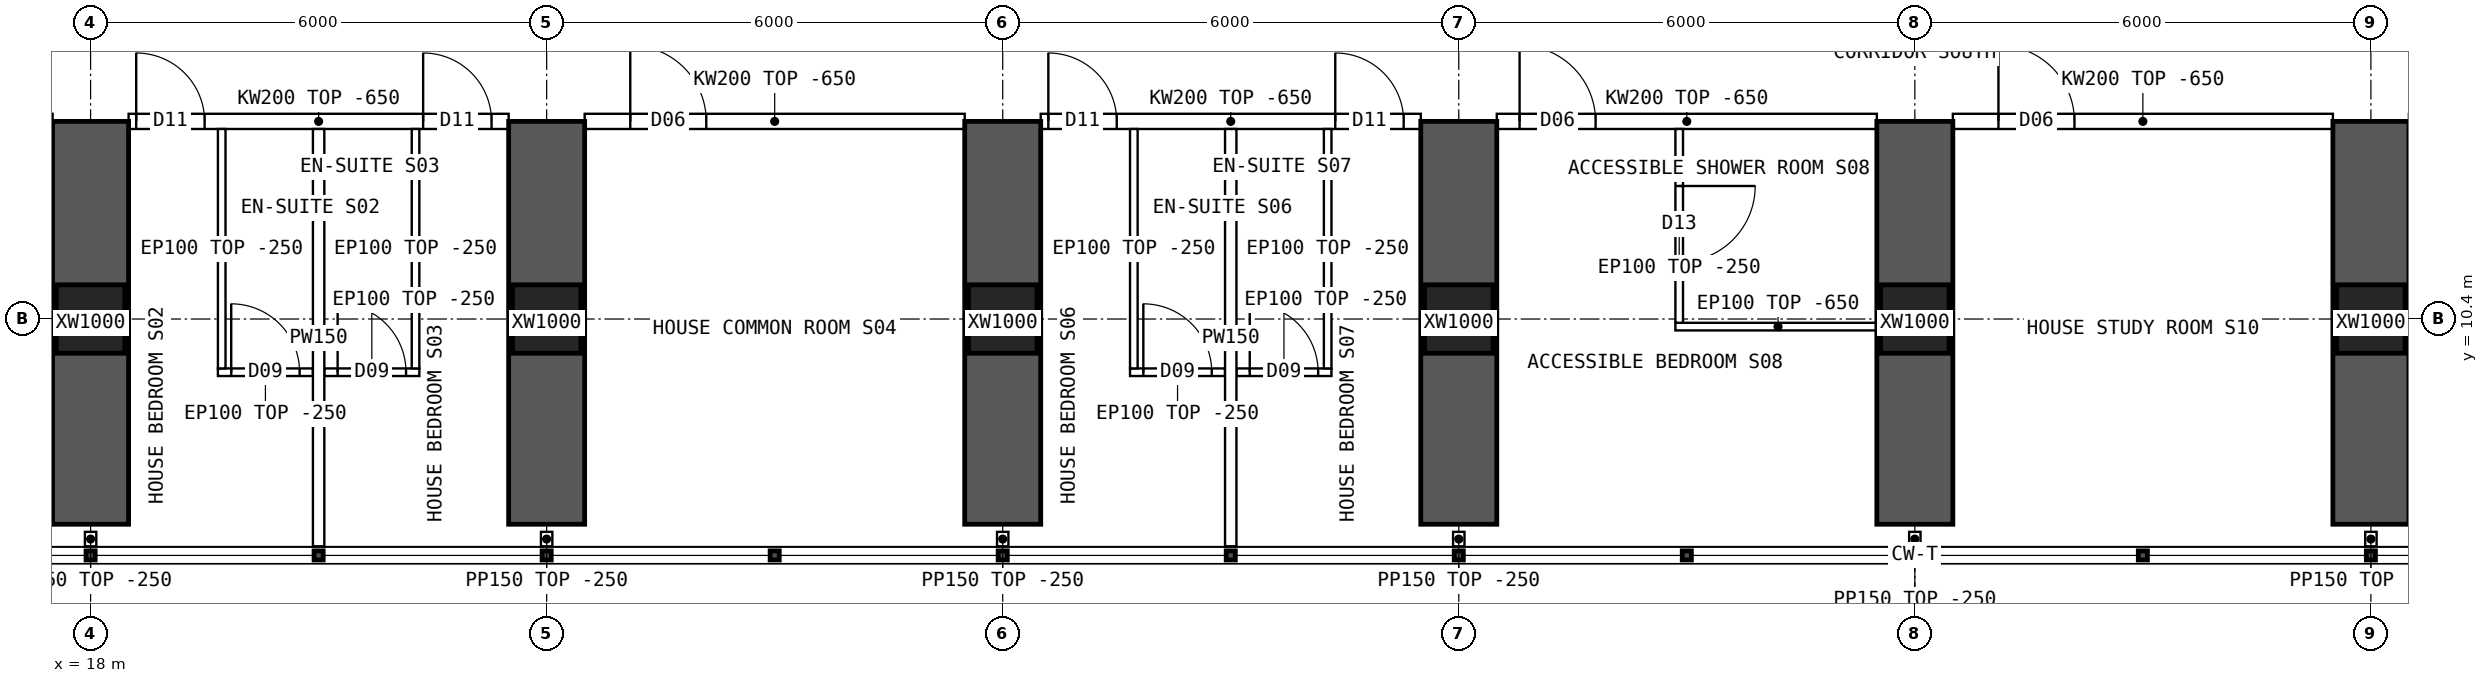
"""IFC4 building model, lengths in metres.
Left out: names, types, materials, properties, quantities, classifications, styles, units other than length and angle.
Written with IfcOpenShell. Run it as: python <this file> out.ifc"""

import sys

from ifc_helpers import new_model, si_unit, direction, frame, frame_2d, origin, origin_2d, place, context, subcontext, project, spatial, polyline, rectangle, hollow_rectangle, outline, extrude, element, fill, save


model = new_model("IFC4")
c1 = context("Model", 3, precision=1e-05, world=origin(), true_north=direction((0.0, 1.0)))
c2 = subcontext(c1, "Body", "Model", "MODEL_VIEW")
j1 = project(units=[si_unit("LENGTHUNIT", "METRE"), si_unit("PLANEANGLEUNIT", "RADIAN")], contexts=[c1])
p1 = place(None, origin())
s1 = spatial("IfcSite", under=j1, at=p1, CompositionType="ELEMENT")
p2 = place(p1, origin())
s2 = spatial("IfcBuilding", under=s1, at=p2, CompositionType="ELEMENT")
p3 = place(p2, frame((0.0, 0.0, 53.95)))
s3 = spatial("IfcBuildingStorey", under=s2, at=p3, CompositionType="ELEMENT", Elevation=53.95)
for number, where, z_axis, x_axis in (
    (1, (18.0, 10.4, 0.0), (0.0, 0.0, 1.0), (1.0, 0.0, 0.0)),
    (2, (24.0, 10.4, 0.0), (0.0, 0.0, 1.0), (1.0, 0.0, 0.0)),
    (3, (30.0, 10.4, 0.0), (0.0, 0.0, 1.0), (1.0, 0.0, 0.0)),
    (4, (36.0, 10.4, 0.0), (0.0, 0.0, 1.0), (1.0, 0.0, 0.0)),
    (5, (42.0, 10.4, 0.0), (0.0, 0.0, 1.0), (1.0, 0.0, 0.0)),
    (6, (48.0, 10.4, 0.0), (0.0, 0.0, 1.0), (1.0, 0.0, 0.0)),
):
    element("IfcColumn", number, at=place(p3, frame(where, z_axis=z_axis, x_axis=x_axis)), inside=s3, PredefinedType="COLUMN", context=c2, shape_type="SweptSolid", body=[
        extrude(hollow_rectangle(XDim=0.9, YDim=0.9, WallThickness=0.09, at=origin_2d()), origin(), (0.0, 0.0, 1.0), 3.75),
    ])
for number, where, z_axis, x_axis in (
    (7, (18.0, 7.7, 0.0), (0.0, 0.0, 1.0), (0.0, 1.0, 0.0)),
    (8, (24.0, 7.7, 0.0), (0.0, 0.0, 1.0), (0.0, 1.0, 0.0)),
    (9, (30.0, 7.7, 0.0), (0.0, 0.0, 1.0), (0.0, 1.0, 0.0)),
    (10, (36.0, 7.7, 0.0), (0.0, 0.0, 1.0), (0.0, 1.0, 0.0)),
    (11, (42.0, 7.7, 0.0), (0.0, 0.0, 1.0), (0.0, 1.0, 0.0)),
    (12, (48.0, 7.7, 0.0), (0.0, 0.0, 1.0), (0.0, 1.0, 0.0)),
):
    element("IfcWall", number, at=place(p3, frame(where, z_axis=z_axis, x_axis=x_axis)), inside=s3, PredefinedType="SHEAR", context=c2, shape_type="SweptSolid", body=[
        extrude(rectangle(XDim=5.3, YDim=1.0, at=frame_2d((2.65, 0.0))), origin(), (0.0, 0.0, 1.0), 3.75),
    ])
p4 = place(p3, frame((18.5, 13.0, 0.0), z_axis=(0.0, 0.0, 1.0), x_axis=(1.0, 0.0, 0.0)))
e13 = element("IfcWall", 13, at=p4, inside=s3, PredefinedType="SOLIDWALL", context=c2, shape_type="SweptSolid", body=[
    extrude(outline(polyline([(0.0, 0.0), (5.0, 0.0), (5.0, 3.1), (0.0, 3.1), (0.0, 0.0)])), frame((0.0, 0.1, 0.0), z_axis=(0.0, -1.0, 0.0), x_axis=(1.0, 0.0, 0.0)), (0.0, 0.0, 1.0), 0.2),
])
p5 = place(p4, frame((0.1, 0.0, 0.0)))
e14 = element("IfcOpeningElement", 14, at=p5, cuts=e13, PredefinedType="OPENING", context=c2, shape_type="SweptSolid", body=[
    extrude(rectangle(XDim=0.9, YDim=2.1, at=frame_2d((0.45, 1.05))), frame((0.0, 0.11, 0.0), z_axis=(0.0, -1.0, 0.0), x_axis=(1.0, 0.0, 0.0)), (0.0, 0.0, 1.0), 0.22),
])
p6 = place(p4, frame((3.875, 0.0, 0.0)))
e15 = element("IfcOpeningElement", 15, at=p6, cuts=e13, PredefinedType="OPENING", context=c2, shape_type="SweptSolid", body=[
    extrude(rectangle(XDim=0.9, YDim=2.1, at=frame_2d((0.45, 1.05))), frame((0.0, 0.11, 0.0), z_axis=(0.0, -1.0, 0.0), x_axis=(1.0, 0.0, 0.0)), (0.0, 0.0, 1.0), 0.22),
])
p7 = place(p3, frame((24.5, 13.0, 0.0), z_axis=(0.0, 0.0, 1.0), x_axis=(1.0, 0.0, 0.0)))
e16 = element("IfcWall", 16, at=p7, inside=s3, PredefinedType="SOLIDWALL", context=c2, shape_type="SweptSolid", body=[
    extrude(outline(polyline([(0.0, 0.0), (5.0, 0.0), (5.0, 3.1), (0.0, 3.1), (0.0, 0.0)])), frame((0.0, 0.1, 0.0), z_axis=(0.0, -1.0, 0.0), x_axis=(1.0, 0.0, 0.0)), (0.0, 0.0, 1.0), 0.2),
])
p8 = place(p7, frame((0.6, 0.0, 0.0)))
e17 = element("IfcOpeningElement", 17, at=p8, cuts=e16, PredefinedType="OPENING", context=c2, shape_type="SweptSolid", body=[
    extrude(rectangle(XDim=1.0, YDim=2.1, at=frame_2d((0.5, 1.05))), frame((0.0, 0.11, 0.0), z_axis=(0.0, -1.0, 0.0), x_axis=(1.0, 0.0, 0.0)), (0.0, 0.0, 1.0), 0.22),
])
p9 = place(p3, frame((30.5, 13.0, 0.0), z_axis=(0.0, 0.0, 1.0), x_axis=(1.0, 0.0, 0.0)))
e18 = element("IfcWall", 18, at=p9, inside=s3, PredefinedType="SOLIDWALL", context=c2, shape_type="SweptSolid", body=[
    extrude(outline(polyline([(0.0, 0.0), (5.0, 0.0), (5.0, 3.1), (0.0, 3.1), (0.0, 0.0)])), frame((0.0, 0.1, 0.0), z_axis=(0.0, -1.0, 0.0), x_axis=(1.0, 0.0, 0.0)), (0.0, 0.0, 1.0), 0.2),
])
p10 = place(p9, frame((0.1, 0.0, 0.0)))
e19 = element("IfcOpeningElement", 19, at=p10, cuts=e18, PredefinedType="OPENING", context=c2, shape_type="SweptSolid", body=[
    extrude(rectangle(XDim=0.9, YDim=2.1, at=frame_2d((0.45, 1.05))), frame((0.0, 0.11, 0.0), z_axis=(0.0, -1.0, 0.0), x_axis=(1.0, 0.0, 0.0)), (0.0, 0.0, 1.0), 0.22),
])
p11 = place(p9, frame((3.875, 0.0, 0.0)))
e20 = element("IfcOpeningElement", 20, at=p11, cuts=e18, PredefinedType="OPENING", context=c2, shape_type="SweptSolid", body=[
    extrude(rectangle(XDim=0.9, YDim=2.1, at=frame_2d((0.45, 1.05))), frame((0.0, 0.11, 0.0), z_axis=(0.0, -1.0, 0.0), x_axis=(1.0, 0.0, 0.0)), (0.0, 0.0, 1.0), 0.22),
])
p12 = place(p3, frame((36.5, 13.0, 0.0), z_axis=(0.0, 0.0, 1.0), x_axis=(1.0, 0.0, 0.0)))
e21 = element("IfcWall", 21, at=p12, inside=s3, PredefinedType="SOLIDWALL", context=c2, shape_type="SweptSolid", body=[
    extrude(outline(polyline([(0.0, 0.0), (5.0, 0.0), (5.0, 3.1), (0.0, 3.1), (0.0, 0.0)])), frame((0.0, 0.1, 0.0), z_axis=(0.0, -1.0, 0.0), x_axis=(1.0, 0.0, 0.0)), (0.0, 0.0, 1.0), 0.2),
])
p13 = place(p12, frame((0.3, 0.0, 0.0)))
e22 = element("IfcOpeningElement", 22, at=p13, cuts=e21, PredefinedType="OPENING", context=c2, shape_type="SweptSolid", body=[
    extrude(rectangle(XDim=1.0, YDim=2.1, at=frame_2d((0.5, 1.05))), frame((0.0, 0.11, 0.0), z_axis=(0.0, -1.0, 0.0), x_axis=(1.0, 0.0, 0.0)), (0.0, 0.0, 1.0), 0.22),
])
p14 = place(p3, frame((42.5, 13.0, 0.0), z_axis=(0.0, 0.0, 1.0), x_axis=(1.0, 0.0, 0.0)))
e23 = element("IfcWall", 23, at=p14, inside=s3, PredefinedType="SOLIDWALL", context=c2, shape_type="SweptSolid", body=[
    extrude(outline(polyline([(0.0, 0.0), (5.0, 0.0), (5.0, 3.1), (0.0, 3.1), (0.0, 0.0)])), frame((0.0, 0.1, 0.0), z_axis=(0.0, -1.0, 0.0), x_axis=(1.0, 0.0, 0.0)), (0.0, 0.0, 1.0), 0.2),
])
p15 = place(p14, frame((0.6, 0.0, 0.0)))
e24 = element("IfcOpeningElement", 24, at=p15, cuts=e23, PredefinedType="OPENING", context=c2, shape_type="SweptSolid", body=[
    extrude(rectangle(XDim=1.0, YDim=2.1, at=frame_2d((0.5, 1.05))), frame((0.0, 0.11, 0.0), z_axis=(0.0, -1.0, 0.0), x_axis=(1.0, 0.0, 0.0)), (0.0, 0.0, 1.0), 0.22),
])
p16 = place(p3, frame((21.0, 7.41, 0.0), z_axis=(0.0, 0.0, 1.0), x_axis=(0.0, 1.0, 0.0)))
e25 = element("IfcWall", 25, at=p16, inside=s3, PredefinedType="PARTITIONING", context=c2, shape_type="SweptSolid", body=[
    extrude(outline(polyline([(0.0, 0.0), (5.49, 0.0), (5.49, 3.1), (5.442, 3.1), (5.44, 3.5), (3.192, 3.5), (3.19, 3.1), (2.792, 3.1), (2.79, 3.5), (0.0, 3.5), (0.0, 0.0)])), frame((0.0, 0.075, 0.0), z_axis=(0.0, -1.0, 0.0), x_axis=(1.0, 0.0, 0.0)), (0.0, 0.0, 1.0), 0.15),
])
p17 = place(p3, frame((20.925, 9.7, 0.0), z_axis=(0.0, 0.0, 1.0), x_axis=(-1.0, 0.0, 0.0)))
e26 = element("IfcWall", 26, at=p17, inside=s3, PredefinedType="PARTITIONING", context=c2, shape_type="SweptSolid", body=[
    extrude(rectangle(XDim=1.25, YDim=0.1, at=frame_2d((0.625, 0.0))), origin(), (0.0, 0.0, 1.0), 3.5),
])
p18 = place(p17, frame((0.175, 0.0, 0.0)))
e27 = element("IfcOpeningElement", 27, at=p18, cuts=e26, PredefinedType="OPENING", context=c2, shape_type="SweptSolid", body=[
    extrude(rectangle(XDim=0.9, YDim=2.1, at=frame_2d((0.45, 1.05))), frame((0.0, 0.06, 0.0), z_axis=(0.0, -1.0, 0.0), x_axis=(1.0, 0.0, 0.0)), (0.0, 0.0, 1.0), 0.12),
])
p19 = place(p3, frame((19.725, 9.75, 0.0), z_axis=(0.0, 0.0, 1.0), x_axis=(0.0, 1.0, 0.0)))
e28 = element("IfcWall", 28, at=p19, inside=s3, PredefinedType="PARTITIONING", context=c2, shape_type="SweptSolid", body=[
    extrude(outline(polyline([(0.0, 0.0), (3.15, 0.0), (3.15, 3.1), (3.102, 3.1), (3.1, 3.5), (0.852, 3.5), (0.85, 3.1), (0.452, 3.1), (0.45, 3.5), (0.0, 3.5), (0.0, 0.0)])), frame((0.0, 0.05, 0.0), z_axis=(0.0, -1.0, 0.0), x_axis=(1.0, 0.0, 0.0)), (0.0, 0.0, 1.0), 0.1),
])
p20 = place(p3, frame((22.325, 9.7, 0.0), z_axis=(0.0, 0.0, 1.0), x_axis=(-1.0, 0.0, 0.0)))
e29 = element("IfcWall", 29, at=p20, inside=s3, PredefinedType="PARTITIONING", context=c2, shape_type="SweptSolid", body=[
    extrude(rectangle(XDim=1.25, YDim=0.1, at=frame_2d((0.625, 0.0))), origin(), (0.0, 0.0, 1.0), 3.5),
])
p21 = place(p20, frame((0.175, 0.0, 0.0)))
e30 = element("IfcOpeningElement", 30, at=p21, cuts=e29, PredefinedType="OPENING", context=c2, shape_type="SweptSolid", body=[
    extrude(rectangle(XDim=0.9, YDim=2.1, at=frame_2d((0.45, 1.05))), frame((0.0, 0.06, 0.0), z_axis=(0.0, -1.0, 0.0), x_axis=(1.0, 0.0, 0.0)), (0.0, 0.0, 1.0), 0.12),
])
p22 = place(p3, frame((22.275, 9.75, 0.0), z_axis=(0.0, 0.0, 1.0), x_axis=(0.0, 1.0, 0.0)))
e31 = element("IfcWall", 31, at=p22, inside=s3, PredefinedType="PARTITIONING", context=c2, shape_type="SweptSolid", body=[
    extrude(outline(polyline([(0.0, 0.0), (3.15, 0.0), (3.15, 3.1), (3.102, 3.1), (3.1, 3.5), (0.852, 3.5), (0.85, 3.1), (0.452, 3.1), (0.45, 3.5), (0.0, 3.5), (0.0, 0.0)])), frame((0.0, 0.05, 0.0), z_axis=(0.0, -1.0, 0.0), x_axis=(1.0, 0.0, 0.0)), (0.0, 0.0, 1.0), 0.1),
])
p23 = place(p3, frame((33.0, 7.41, 0.0), z_axis=(0.0, 0.0, 1.0), x_axis=(0.0, 1.0, 0.0)))
e32 = element("IfcWall", 32, at=p23, inside=s3, PredefinedType="PARTITIONING", context=c2, shape_type="SweptSolid", body=[
    extrude(outline(polyline([(0.0, 0.0), (5.49, 0.0), (5.49, 3.1), (5.442, 3.1), (5.44, 3.5), (3.192, 3.5), (3.19, 3.1), (2.792, 3.1), (2.79, 3.5), (0.0, 3.5), (0.0, 0.0)])), frame((0.0, 0.075, 0.0), z_axis=(0.0, -1.0, 0.0), x_axis=(1.0, 0.0, 0.0)), (0.0, 0.0, 1.0), 0.15),
])
p24 = place(p3, frame((32.925, 9.7, 0.0), z_axis=(0.0, 0.0, 1.0), x_axis=(-1.0, 0.0, 0.0)))
e33 = element("IfcWall", 33, at=p24, inside=s3, PredefinedType="PARTITIONING", context=c2, shape_type="SweptSolid", body=[
    extrude(rectangle(XDim=1.25, YDim=0.1, at=frame_2d((0.625, 0.0))), origin(), (0.0, 0.0, 1.0), 3.5),
])
p25 = place(p24, frame((0.175, 0.0, 0.0)))
e34 = element("IfcOpeningElement", 34, at=p25, cuts=e33, PredefinedType="OPENING", context=c2, shape_type="SweptSolid", body=[
    extrude(rectangle(XDim=0.9, YDim=2.1, at=frame_2d((0.45, 1.05))), frame((0.0, 0.06, 0.0), z_axis=(0.0, -1.0, 0.0), x_axis=(1.0, 0.0, 0.0)), (0.0, 0.0, 1.0), 0.12),
])
p26 = place(p3, frame((31.725, 9.75, 0.0), z_axis=(0.0, 0.0, 1.0), x_axis=(0.0, 1.0, 0.0)))
e35 = element("IfcWall", 35, at=p26, inside=s3, PredefinedType="PARTITIONING", context=c2, shape_type="SweptSolid", body=[
    extrude(outline(polyline([(0.0, 0.0), (3.15, 0.0), (3.15, 3.1), (3.102, 3.1), (3.1, 3.5), (0.852, 3.5), (0.85, 3.1), (0.452, 3.1), (0.45, 3.5), (0.0, 3.5), (0.0, 0.0)])), frame((0.0, 0.05, 0.0), z_axis=(0.0, -1.0, 0.0), x_axis=(1.0, 0.0, 0.0)), (0.0, 0.0, 1.0), 0.1),
])
p27 = place(p3, frame((34.325, 9.7, 0.0), z_axis=(0.0, 0.0, 1.0), x_axis=(-1.0, 0.0, 0.0)))
e36 = element("IfcWall", 36, at=p27, inside=s3, PredefinedType="PARTITIONING", context=c2, shape_type="SweptSolid", body=[
    extrude(rectangle(XDim=1.25, YDim=0.1, at=frame_2d((0.625, 0.0))), origin(), (0.0, 0.0, 1.0), 3.5),
])
p28 = place(p27, frame((0.175, 0.0, 0.0)))
e37 = element("IfcOpeningElement", 37, at=p28, cuts=e36, PredefinedType="OPENING", context=c2, shape_type="SweptSolid", body=[
    extrude(rectangle(XDim=0.9, YDim=2.1, at=frame_2d((0.45, 1.05))), frame((0.0, 0.06, 0.0), z_axis=(0.0, -1.0, 0.0), x_axis=(1.0, 0.0, 0.0)), (0.0, 0.0, 1.0), 0.12),
])
p29 = place(p3, frame((34.275, 9.75, 0.0), z_axis=(0.0, 0.0, 1.0), x_axis=(0.0, 1.0, 0.0)))
e38 = element("IfcWall", 38, at=p29, inside=s3, PredefinedType="PARTITIONING", context=c2, shape_type="SweptSolid", body=[
    extrude(outline(polyline([(0.0, 0.0), (3.15, 0.0), (3.15, 3.1), (3.102, 3.1), (3.1, 3.5), (0.852, 3.5), (0.85, 3.1), (0.452, 3.1), (0.45, 3.5), (0.0, 3.5), (0.0, 0.0)])), frame((0.0, 0.05, 0.0), z_axis=(0.0, -1.0, 0.0), x_axis=(1.0, 0.0, 0.0)), (0.0, 0.0, 1.0), 0.1),
])
p30 = place(p3, frame((38.85, 10.3, 0.0), z_axis=(0.0, 0.0, 1.0), x_axis=(1.0, 0.0, 0.0)))
e39 = element("IfcWall", 39, at=p30, inside=s3, PredefinedType="PARTITIONING", context=c2, shape_type="SweptSolid", body=[
    extrude(outline(polyline([(0.0, 0.0), (2.7, 0.0), (2.7, 3.1), (0.0, 3.1), (0.0, 0.0)])), frame((0.0, 0.05, 0.0), z_axis=(0.0, -1.0, 0.0), x_axis=(1.0, 0.0, 0.0)), (0.0, 0.0, 1.0), 0.1),
])
p31 = place(p3, frame((38.9, 10.35, 0.0), z_axis=(0.0, 0.0, 1.0), x_axis=(0.0, 1.0, 0.0)))
e40 = element("IfcWall", 40, at=p31, inside=s3, PredefinedType="PARTITIONING", context=c2, shape_type="SweptSolid", body=[
    extrude(outline(polyline([(0.0, 0.0), (2.55, 0.0), (2.55, 3.1), (2.502, 3.1), (2.5, 3.5), (0.252, 3.5), (0.25, 3.1), (0.0, 3.1), (0.0, 0.0)])), frame((0.0, 0.05, 0.0), z_axis=(0.0, -1.0, 0.0), x_axis=(1.0, 0.0, 0.0)), (0.0, 0.0, 1.0), 0.1),
])
p32 = place(p31, frame((0.8, 0.0, 0.0)))
e41 = element("IfcOpeningElement", 41, at=p32, cuts=e40, PredefinedType="OPENING", context=c2, shape_type="SweptSolid", body=[
    extrude(rectangle(XDim=1.0, YDim=2.1, at=frame_2d((0.5, 1.05))), frame((0.0, 0.06, 0.0), z_axis=(0.0, -1.0, 0.0), x_axis=(1.0, 0.0, 0.0)), (0.0, 0.0, 1.0), 0.12),
])
for number, where, z_axis, x_axis in (
    (42, (18.0, 7.6, 0.0), (0.0, 0.0, 1.0), (0.0, -1.0, 0.0)),
    (43, (24.0, 7.6, 0.0), (0.0, 0.0, 1.0), (0.0, -1.0, 0.0)),
    (44, (30.0, 7.6, 0.0), (0.0, 0.0, 1.0), (0.0, -1.0, 0.0)),
    (45, (36.0, 7.6, 0.0), (0.0, 0.0, 1.0), (0.0, -1.0, 0.0)),
    (46, (42.0, 7.6, 0.0), (0.0, 0.0, 1.0), (0.0, -1.0, 0.0)),
    (47, (48.0, 7.6, 0.0), (0.0, 0.0, 1.0), (0.0, -1.0, 0.0)),
):
    element("IfcWall", number, at=place(p3, frame(where, z_axis=z_axis, x_axis=x_axis)), inside=s3, PredefinedType="PARTITIONING", context=c2, shape_type="SweptSolid", body=[
        extrude(rectangle(XDim=0.19, YDim=0.15, at=frame_2d((0.095, 0.0))), origin(), (0.0, 0.0, 1.0), 3.5),
    ])
p33 = place(p18, origin())
e48 = element("IfcDoor", 48, at=p33, inside=s3, OperationType="SINGLE_SWING_RIGHT", PredefinedType="DOOR", context=c2, shape_type="SweptSolid", body=[
    extrude(rectangle(XDim=0.9, YDim=2.1, at=frame_2d((0.45, 1.05))), frame((0.0, 0.025, 0.0), z_axis=(0.0, -1.0, 0.0), x_axis=(1.0, 0.0, 0.0)), (0.0, 0.0, 1.0), 0.05),
])
fill(e27, e48)
p34 = place(p5, origin())
e49 = element("IfcDoor", 49, at=p34, inside=s3, OperationType="SINGLE_SWING_LEFT", PredefinedType="DOOR", context=c2, shape_type="SweptSolid", body=[
    extrude(rectangle(XDim=0.9, YDim=2.1, at=frame_2d((0.45, 1.05))), frame((0.0, 0.025, 0.0), z_axis=(0.0, -1.0, 0.0), x_axis=(1.0, 0.0, 0.0)), (0.0, 0.0, 1.0), 0.05),
])
fill(e14, e49)
p35 = place(p21, origin())
e50 = element("IfcDoor", 50, at=p35, inside=s3, OperationType="SINGLE_SWING_RIGHT", PredefinedType="DOOR", context=c2, shape_type="SweptSolid", body=[
    extrude(rectangle(XDim=0.9, YDim=2.1, at=frame_2d((0.45, 1.05))), frame((0.0, 0.025, 0.0), z_axis=(0.0, -1.0, 0.0), x_axis=(1.0, 0.0, 0.0)), (0.0, 0.0, 1.0), 0.05),
])
fill(e30, e50)
p36 = place(p6, origin())
e51 = element("IfcDoor", 51, at=p36, inside=s3, OperationType="SINGLE_SWING_LEFT", PredefinedType="DOOR", context=c2, shape_type="SweptSolid", body=[
    extrude(rectangle(XDim=0.9, YDim=2.1, at=frame_2d((0.45, 1.05))), frame((0.0, 0.025, 0.0), z_axis=(0.0, -1.0, 0.0), x_axis=(1.0, 0.0, 0.0)), (0.0, 0.0, 1.0), 0.05),
])
fill(e15, e51)
p37 = place(p8, origin())
e52 = element("IfcDoor", 52, at=p37, inside=s3, OperationType="SINGLE_SWING_LEFT", PredefinedType="DOOR", context=c2, shape_type="SweptSolid", body=[
    extrude(rectangle(XDim=1.0, YDim=2.1, at=frame_2d((0.5, 1.05))), frame((0.0, 0.025, 0.0), z_axis=(0.0, -1.0, 0.0), x_axis=(1.0, 0.0, 0.0)), (0.0, 0.0, 1.0), 0.05),
])
fill(e17, e52)
p38 = place(p25, origin())
e53 = element("IfcDoor", 53, at=p38, inside=s3, OperationType="SINGLE_SWING_RIGHT", PredefinedType="DOOR", context=c2, shape_type="SweptSolid", body=[
    extrude(rectangle(XDim=0.9, YDim=2.1, at=frame_2d((0.45, 1.05))), frame((0.0, 0.025, 0.0), z_axis=(0.0, -1.0, 0.0), x_axis=(1.0, 0.0, 0.0)), (0.0, 0.0, 1.0), 0.05),
])
fill(e34, e53)
p39 = place(p10, origin())
e54 = element("IfcDoor", 54, at=p39, inside=s3, OperationType="SINGLE_SWING_LEFT", PredefinedType="DOOR", context=c2, shape_type="SweptSolid", body=[
    extrude(rectangle(XDim=0.9, YDim=2.1, at=frame_2d((0.45, 1.05))), frame((0.0, 0.025, 0.0), z_axis=(0.0, -1.0, 0.0), x_axis=(1.0, 0.0, 0.0)), (0.0, 0.0, 1.0), 0.05),
])
fill(e19, e54)
p40 = place(p28, origin())
e55 = element("IfcDoor", 55, at=p40, inside=s3, OperationType="SINGLE_SWING_RIGHT", PredefinedType="DOOR", context=c2, shape_type="SweptSolid", body=[
    extrude(rectangle(XDim=0.9, YDim=2.1, at=frame_2d((0.45, 1.05))), frame((0.0, 0.025, 0.0), z_axis=(0.0, -1.0, 0.0), x_axis=(1.0, 0.0, 0.0)), (0.0, 0.0, 1.0), 0.05),
])
fill(e37, e55)
p41 = place(p11, origin())
e56 = element("IfcDoor", 56, at=p41, inside=s3, OperationType="SINGLE_SWING_LEFT", PredefinedType="DOOR", context=c2, shape_type="SweptSolid", body=[
    extrude(rectangle(XDim=0.9, YDim=2.1, at=frame_2d((0.45, 1.05))), frame((0.0, 0.025, 0.0), z_axis=(0.0, -1.0, 0.0), x_axis=(1.0, 0.0, 0.0)), (0.0, 0.0, 1.0), 0.05),
])
fill(e20, e56)
p42 = place(p32, origin())
e57 = element("IfcDoor", 57, at=p42, inside=s3, OperationType="SINGLE_SWING_RIGHT", PredefinedType="DOOR", context=c2, shape_type="SweptSolid", body=[
    extrude(rectangle(XDim=1.0, YDim=2.1, at=frame_2d((0.5, 1.05))), frame((0.0, 0.025, 0.0), z_axis=(0.0, -1.0, 0.0), x_axis=(1.0, 0.0, 0.0)), (0.0, 0.0, 1.0), 0.05),
])
fill(e41, e57)
p43 = place(p13, origin())
e58 = element("IfcDoor", 58, at=p43, inside=s3, OperationType="SINGLE_SWING_LEFT", PredefinedType="DOOR", context=c2, shape_type="SweptSolid", body=[
    extrude(rectangle(XDim=1.0, YDim=2.1, at=frame_2d((0.5, 1.05))), frame((0.0, 0.025, 0.0), z_axis=(0.0, -1.0, 0.0), x_axis=(1.0, 0.0, 0.0)), (0.0, 0.0, 1.0), 0.05),
])
fill(e22, e58)
p44 = place(p15, origin())
e59 = element("IfcDoor", 59, at=p44, inside=s3, OperationType="SINGLE_SWING_LEFT", PredefinedType="DOOR", context=c2, shape_type="SweptSolid", body=[
    extrude(rectangle(XDim=1.0, YDim=2.1, at=frame_2d((0.5, 1.05))), frame((0.0, 0.025, 0.0), z_axis=(0.0, -1.0, 0.0), x_axis=(1.0, 0.0, 0.0)), (0.0, 0.0, 1.0), 0.05),
])
fill(e24, e59)
save(model, sys.argv[1])
